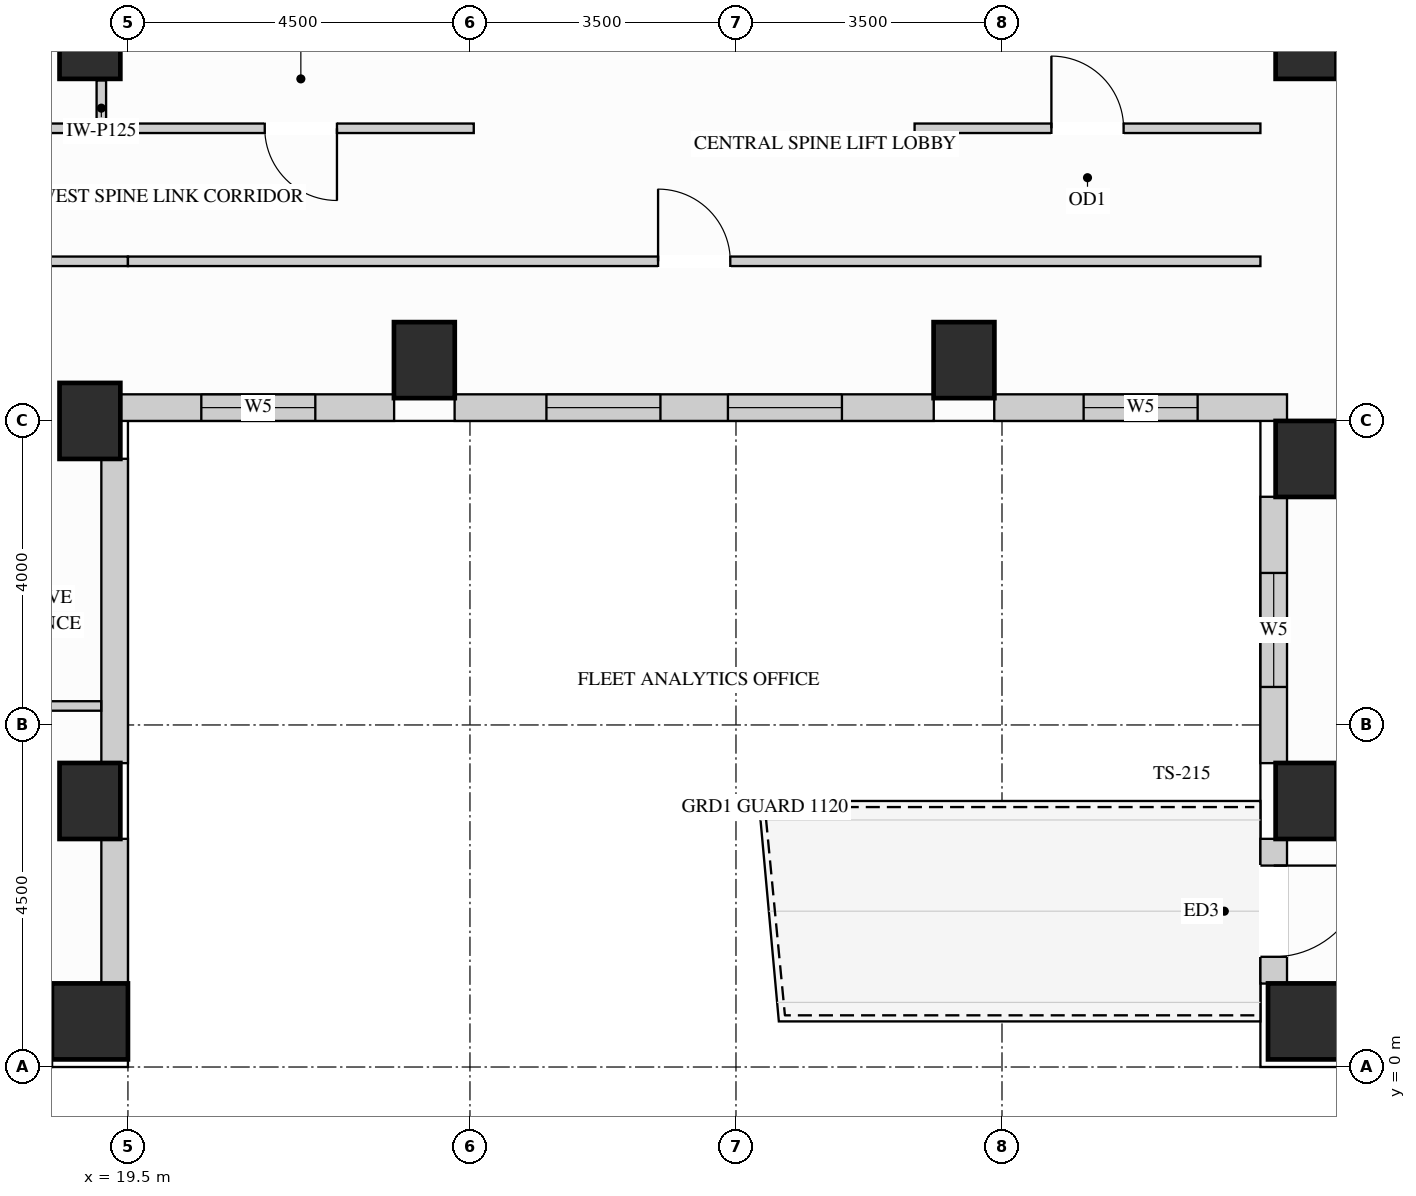
"""IFC4 building model, lengths in metres.
Left out: names, types, materials, properties, quantities, classifications, styles, units other than length and angle.
Written with IfcOpenShell. Run it as: python <this file> out.ifc"""

import sys

from ifc_helpers import new_model, si_unit, direction, frame, frame_2d, origin, origin_2d, place, context, subcontext, project, spatial, rectangle, extrude, source, transform, mapped, element, fill, save


model = new_model("IFC4")
c1 = context("Model", 3, precision=1e-05, world=origin(), true_north=direction((0.0, 1.0)))
c2 = subcontext(c1, "Body", "Model", "MODEL_VIEW")
j1 = project(units=[si_unit("LENGTHUNIT", "METRE"), si_unit("PLANEANGLEUNIT", "RADIAN")], contexts=[c1])
p1 = place(None, origin())
s1 = spatial("IfcSite", under=j1, at=p1, CompositionType="ELEMENT")
p2 = place(p1, origin())
s2 = spatial("IfcBuilding", under=s1, at=p2, CompositionType="ELEMENT")
p3 = place(p2, frame((0.0, 0.0, 164.7)))
s3 = spatial("IfcBuildingStorey", under=s2, at=p3, CompositionType="ELEMENT", Elevation=164.7)
m1 = source(origin(), c2, "Body", "SweptSolid", [
    extrude(rectangle(XDim=0.8, YDim=1.0, at=origin_2d()), origin(), (0.0, 0.0, 1.0), 3.4),
])
for number, where, z_axis, x_axis in (
    (1, (19.0, 13.5, 0.0), (0.0, 0.0, 1.0), (1.0, 0.0, 0.0)),
    (2, (19.0, 3.5, 0.0), (0.0, 0.0, 1.0), (1.0, 0.0, 0.0)),
    (3, (19.0, 8.5, 0.0), (0.0, 0.0, 1.0), (1.0, 0.0, 0.0)),
    (4, (35.0, 13.5, 0.0), (0.0, 0.0, 1.0), (1.0, 0.0, 0.0)),
    (5, (35.0, 3.5, 0.0), (0.0, 0.0, 1.0), (1.0, 0.0, 0.0)),
    (6, (35.0, 8.0, 0.0), (0.0, 0.0, 1.0), (1.0, 0.0, 0.0)),
    (7, (23.4, 9.3, 0.0), (0.0, 0.0, 1.0), (1.0, 0.0, 0.0)),
    (8, (30.5, 9.3, 0.0), (0.0, 0.0, 1.0), (1.0, 0.0, 0.0)),
):
    element("IfcColumn", number, at=place(p3, frame(where, z_axis=z_axis, x_axis=x_axis)), inside=s3, PredefinedType="COLUMN", context=c2, shape_type="MappedRepresentation", body=[
        mapped(m1, transform((0.0, 0.0, 0.0), x_axis=(1.0, 0.0, 0.0), y_axis=(0.0, 1.0, 0.0), z_axis=(0.0, 0.0, 1.0))),
    ])
m2 = source(origin(), c2, "Body", "SweptSolid", [
    extrude(rectangle(XDim=1.0, YDim=1.0, at=origin_2d()), origin(), (0.0, 0.0, 1.0), 3.4),
])
for number, where, z_axis, x_axis in (
    (9, (19.0, 0.6, 0.0), (0.0, 0.0, 1.0), (1.0, 0.0, 0.0)),
    (10, (35.0, 0.6, 0.0), (0.0, 0.0, 1.0), (1.0, 0.0, 0.0)),
):
    element("IfcColumn", number, at=place(p3, frame(where, z_axis=z_axis, x_axis=x_axis)), inside=s3, PredefinedType="COLUMN", context=c2, shape_type="MappedRepresentation", body=[
        mapped(m2, transform((0.0, 0.0, 0.0), x_axis=(1.0, 0.0, 0.0), y_axis=(0.0, 1.0, 0.0), z_axis=(0.0, 0.0, 1.0))),
    ])
p4 = place(p3, frame((14.998, 0.175, 0.0), z_axis=(0.0, 0.0, 1.0), x_axis=(1.0, 0.0, 0.0)))
e11 = element("IfcWall", 11, at=p4, inside=s3, PredefinedType="SOLIDWALL", context=c2, shape_type="SweptSolid", body=[
    extrude(rectangle(XDim=3.504, YDim=0.35, at=frame_2d((1.752, 0.0))), origin(), (0.0, 0.0, 1.0), 2.612),
])
p5 = place(p4, frame((0.552, 0.0, 0.78)))
e12 = element("IfcOpeningElement", 12, at=p5, cuts=e11, PredefinedType="OPENING", context=c2, shape_type="SweptSolid", body=[
    extrude(rectangle(XDim=2.4, YDim=1.652, at=frame_2d((1.2, 0.826))), frame((0.0, 0.185, 0.0), z_axis=(0.0, -1.0, 0.0), x_axis=(1.0, 0.0, 0.0)), (0.0, 0.0, 1.0), 0.37),
])
m3 = source(origin(), c2, "Body", "SweptSolid", [
    extrude(rectangle(XDim=1.904, YDim=0.35, at=frame_2d((0.952, 0.0))), origin(), (0.0, 0.0, 1.0), 2.612),
])
p6 = place(p3, frame((19.325, 1.098, 0.0), z_axis=(0.0, 0.0, 1.0), x_axis=(0.0, 1.0, 0.0)))
e13 = element("IfcWall", 13, at=p6, inside=s3, PredefinedType="SOLIDWALL", context=c2, shape_type="MappedRepresentation", body=[
    mapped(m3, transform((0.0, 0.0, 0.0), x_axis=(1.0, 0.0, 0.0), y_axis=(0.0, 1.0, 0.0), z_axis=(0.0, 0.0, 1.0))),
])
m4 = source(origin(), c2, "Body", "SweptSolid", [
    extrude(rectangle(XDim=4.004, YDim=0.35, at=frame_2d((2.002, 0.0))), origin(), (0.0, 0.0, 1.0), 2.612),
])
p7 = place(p3, frame((19.325, 3.998, 0.0), z_axis=(0.0, 0.0, 1.0), x_axis=(0.0, 1.0, 0.0)))
e14 = element("IfcWall", 14, at=p7, inside=s3, PredefinedType="SOLIDWALL", context=c2, shape_type="MappedRepresentation", body=[
    mapped(m4, transform((0.0, 0.0, 0.0), x_axis=(1.0, 0.0, 0.0), y_axis=(0.0, 1.0, 0.0), z_axis=(0.0, 0.0, 1.0))),
])
p8 = place(p3, frame((19.398, 8.675, 0.0), z_axis=(0.0, 0.0, 1.0), x_axis=(1.0, 0.0, 0.0)))
e15 = element("IfcWall", 15, at=p8, inside=s3, PredefinedType="SOLIDWALL", context=c2, shape_type="SweptSolid", body=[
    extrude(rectangle(XDim=3.604, YDim=0.35, at=frame_2d((1.802, 0.0))), origin(), (0.0, 0.0, 1.0), 3.385),
])
p9 = place(p8, frame((1.067, 0.0, 0.78)))
e16 = element("IfcOpeningElement", 16, at=p9, cuts=e15, PredefinedType="OPENING", context=c2, shape_type="SweptSolid", body=[
    extrude(rectangle(XDim=1.5, YDim=2.0, at=frame_2d((0.75, 1.0))), frame((0.0, 0.185, 0.0), z_axis=(0.0, -1.0, 0.0), x_axis=(1.0, 0.0, 0.0)), (0.0, 0.0, 1.0), 0.37),
])
p10 = place(p3, frame((23.798, 8.675, 0.0), z_axis=(0.0, 0.0, 1.0), x_axis=(1.0, 0.0, 0.0)))
e17 = element("IfcWall", 17, at=p10, inside=s3, PredefinedType="SOLIDWALL", context=c2, shape_type="SweptSolid", body=[
    extrude(rectangle(XDim=6.304, YDim=0.35, at=frame_2d((3.152, 0.0))), origin(), (0.0, 0.0, 1.0), 3.385),
])
p11 = place(p10, frame((1.208, 0.0, 0.78)))
e18 = element("IfcOpeningElement", 18, at=p11, cuts=e17, PredefinedType="OPENING", context=c2, shape_type="SweptSolid", body=[
    extrude(rectangle(XDim=1.5, YDim=2.0, at=frame_2d((0.75, 1.0))), frame((0.0, 0.185, 0.0), z_axis=(0.0, -1.0, 0.0), x_axis=(1.0, 0.0, 0.0)), (0.0, 0.0, 1.0), 0.37),
])
p12 = place(p10, frame((3.596, 0.0, 0.78)))
e19 = element("IfcOpeningElement", 19, at=p12, cuts=e17, PredefinedType="OPENING", context=c2, shape_type="SweptSolid", body=[
    extrude(rectangle(XDim=1.5, YDim=2.0, at=frame_2d((0.75, 1.0))), frame((0.0, 0.185, 0.0), z_axis=(0.0, -1.0, 0.0), x_axis=(1.0, 0.0, 0.0)), (0.0, 0.0, 1.0), 0.37),
])
p13 = place(p3, frame((30.898, 8.675, 0.0), z_axis=(0.0, 0.0, 1.0), x_axis=(1.0, 0.0, 0.0)))
e20 = element("IfcWall", 20, at=p13, inside=s3, PredefinedType="SOLIDWALL", context=c2, shape_type="SweptSolid", body=[
    extrude(rectangle(XDim=3.852, YDim=0.35, at=frame_2d((1.926, 0.0))), origin(), (0.0, 0.0, 1.0), 3.385),
])
p14 = place(p13, frame((1.176, 0.0, 0.78)))
e21 = element("IfcOpeningElement", 21, at=p14, cuts=e20, PredefinedType="OPENING", context=c2, shape_type="SweptSolid", body=[
    extrude(rectangle(XDim=1.5, YDim=2.0, at=frame_2d((0.75, 1.0))), frame((0.0, 0.185, 0.0), z_axis=(0.0, -1.0, 0.0), x_axis=(1.0, 0.0, 0.0)), (0.0, 0.0, 1.0), 0.37),
])
p15 = place(p3, frame((34.575, 7.502, 0.0), z_axis=(0.0, 0.0, 1.0), x_axis=(0.0, -1.0, 0.0)))
e22 = element("IfcWall", 22, at=p15, inside=s3, PredefinedType="SOLIDWALL", context=c2, shape_type="SweptSolid", body=[
    extrude(rectangle(XDim=3.504, YDim=0.35, at=frame_2d((1.752, 0.0))), origin(), (0.0, 0.0, 1.0), 2.612),
])
p16 = place(p15, frame((1.002, 0.0, 0.78)))
e23 = element("IfcOpeningElement", 23, at=p16, cuts=e22, PredefinedType="OPENING", context=c2, shape_type="SweptSolid", body=[
    extrude(rectangle(XDim=1.5, YDim=1.652, at=frame_2d((0.75, 0.826))), frame((0.0, 0.185, 0.0), z_axis=(0.0, -1.0, 0.0), x_axis=(1.0, 0.0, 0.0)), (0.0, 0.0, 1.0), 0.37),
])
p17 = place(p3, frame((34.575, 3.002, 0.0), z_axis=(0.0, 0.0, 1.0), x_axis=(0.0, -1.0, 0.0)))
e24 = element("IfcWall", 24, at=p17, inside=s3, PredefinedType="SOLIDWALL", context=c2, shape_type="SweptSolid", body=[
    extrude(rectangle(XDim=1.904, YDim=0.35, at=frame_2d((0.952, 0.0))), origin(), (0.0, 0.0, 1.0), 2.612),
])
p18 = place(p17, frame((0.352, 0.0, 0.0)))
e25 = element("IfcOpeningElement", 25, at=p18, cuts=e24, PredefinedType="OPENING", context=c2, shape_type="SweptSolid", body=[
    extrude(rectangle(XDim=1.2, YDim=2.15, at=frame_2d((0.6, 1.075))), frame((0.0, 0.185, 0.0), z_axis=(0.0, -1.0, 0.0), x_axis=(1.0, 0.0, 0.0)), (0.0, 0.0, 1.0), 0.37),
])
m5 = source(origin(), c2, "Body", "SweptSolid", [
    extrude(rectangle(XDim=0.63, YDim=0.125, at=frame_2d((0.315, 0.0))), origin(), (0.0, 0.0, 1.0), 2.773),
])
p19 = place(p3, frame((19.15, 12.35, 0.0), z_axis=(0.0, 0.0, 1.0), x_axis=(0.0, 1.0, 0.0)))
e26 = element("IfcWall", 26, at=p19, inside=s3, PredefinedType="PARTITIONING", context=c2, shape_type="MappedRepresentation", body=[
    mapped(m5, transform((0.0, 0.0, 0.0), x_axis=(1.0, 0.0, 0.0), y_axis=(0.0, 1.0, 0.0), z_axis=(0.0, 0.0, 1.0))),
])
p20 = place(p3, frame((29.85, 12.35, 0.0), z_axis=(0.0, 0.0, 1.0), x_axis=(1.0, 0.0, 0.0)))
e27 = element("IfcWall", 27, at=p20, inside=s3, PredefinedType="PARTITIONING", context=c2, shape_type="SweptSolid", body=[
    extrude(rectangle(XDim=4.55, YDim=0.125, at=frame_2d((2.275, 0.0))), origin(), (0.0, 0.0, 1.0), 3.385),
])
p21 = place(p20, frame((1.8, 0.0, 0.0)))
e28 = element("IfcOpeningElement", 28, at=p21, cuts=e27, PredefinedType="OPENING", context=c2, shape_type="SweptSolid", body=[
    extrude(rectangle(XDim=0.95, YDim=2.15, at=frame_2d((0.475, 1.075))), frame((0.0, 0.073, 0.0), z_axis=(0.0, -1.0, 0.0), x_axis=(1.0, 0.0, 0.0)), (0.0, 0.0, 1.0), 0.145),
])
m6 = source(origin(), c2, "Body", "SweptSolid", [
    extrude(rectangle(XDim=2.45, YDim=0.125, at=frame_2d((1.225, 0.0))), origin(), (0.0, 0.0, 1.0), 3.385),
])
p22 = place(p3, frame((17.05, 12.35, 0.0), z_axis=(0.0, 0.0, 1.0), x_axis=(1.0, 0.0, 0.0)))
e29 = element("IfcWall", 29, at=p22, inside=s3, PredefinedType="PARTITIONING", context=c2, shape_type="MappedRepresentation", body=[
    mapped(m6, transform((0.0, 0.0, 0.0), x_axis=(1.0, 0.0, 0.0), y_axis=(0.0, 1.0, 0.0), z_axis=(0.0, 0.0, 1.0))),
])
p23 = place(p3, frame((19.5, 12.35, 0.0), z_axis=(0.0, 0.0, 1.0), x_axis=(1.0, 0.0, 0.0)))
e30 = element("IfcWall", 30, at=p23, inside=s3, PredefinedType="PARTITIONING", context=c2, shape_type="SweptSolid", body=[
    extrude(rectangle(XDim=4.55, YDim=0.125, at=frame_2d((2.275, 0.0))), origin(), (0.0, 0.0, 1.0), 3.385),
])
p24 = place(p23, frame((1.8, 0.0, 0.0)))
e31 = element("IfcOpeningElement", 31, at=p24, cuts=e30, PredefinedType="OPENING", context=c2, shape_type="SweptSolid", body=[
    extrude(rectangle(XDim=0.95, YDim=2.15, at=frame_2d((0.475, 1.075))), frame((0.0, 0.073, 0.0), z_axis=(0.0, -1.0, 0.0), x_axis=(1.0, 0.0, 0.0)), (0.0, 0.0, 1.0), 0.145),
])
p25 = place(p3, frame((17.05, 10.6, 0.0), z_axis=(0.0, 0.0, 1.0), x_axis=(1.0, 0.0, 0.0)))
e32 = element("IfcWall", 32, at=p25, inside=s3, PredefinedType="PARTITIONING", context=c2, shape_type="MappedRepresentation", body=[
    mapped(m6, transform((0.0, 0.0, 0.0), x_axis=(1.0, 0.0, 0.0), y_axis=(0.0, 1.0, 0.0), z_axis=(0.0, 0.0, 1.0))),
])
p26 = place(p3, frame((19.5, 10.6, 0.0), z_axis=(0.0, 0.0, 1.0), x_axis=(1.0, 0.0, 0.0)))
e33 = element("IfcWall", 33, at=p26, inside=s3, PredefinedType="PARTITIONING", context=c2, shape_type="SweptSolid", body=[
    extrude(rectangle(XDim=14.9, YDim=0.125, at=frame_2d((7.45, 0.0))), origin(), (0.0, 0.0, 1.0), 3.385),
])
p27 = place(p26, frame((6.975, 0.0, 0.0)))
e34 = element("IfcOpeningElement", 34, at=p27, cuts=e33, PredefinedType="OPENING", context=c2, shape_type="SweptSolid", body=[
    extrude(rectangle(XDim=0.95, YDim=2.15, at=frame_2d((0.475, 1.075))), frame((0.0, 0.073, 0.0), z_axis=(0.0, -1.0, 0.0), x_axis=(1.0, 0.0, 0.0)), (0.0, 0.0, 1.0), 0.145),
])
m7 = source(origin(), c2, "Body", "SweptSolid", [
    extrude(rectangle(XDim=2.098, YDim=0.125, at=frame_2d((1.049, 0.0))), origin(), (0.0, 0.0, 1.0), 2.848),
])
p28 = place(p3, frame((17.05, 4.75, 0.0), z_axis=(0.0, 0.0, 1.0), x_axis=(1.0, 0.0, 0.0)))
e35 = element("IfcWall", 35, at=p28, inside=s3, PredefinedType="PARTITIONING", context=c2, shape_type="MappedRepresentation", body=[
    mapped(m7, transform((0.0, 0.0, 0.0), x_axis=(1.0, 0.0, 0.0), y_axis=(0.0, 1.0, 0.0), z_axis=(0.0, 0.0, 1.0))),
])
m8 = source(origin(), c2, "Body", "SweptSolid", [
    extrude(rectangle(XDim=1.2, YDim=2.15, at=frame_2d((0.6, 1.075))), frame((0.0, 0.025, 0.0), z_axis=(0.0, -1.0, 0.0), x_axis=(1.0, 0.0, 0.0)), (0.0, 0.0, 1.0), 0.05),
])
p29 = place(p18, frame((1.2, 0.0, 0.0), z_axis=(0.0, 0.0, 1.0), x_axis=(-1.0, 0.0, 0.0)))
e36 = element("IfcDoor", 36, at=p29, inside=s3, OperationType="SINGLE_SWING_LEFT", PredefinedType="DOOR", context=c2, shape_type="MappedRepresentation", body=[
    mapped(m8, transform((0.0, 0.0, 0.0), x_axis=(1.0, 0.0, 0.0), y_axis=(0.0, 1.0, 0.0), z_axis=(0.0, 0.0, 1.0))),
])
fill(e25, e36)
m9 = source(origin(), c2, "Body", "SweptSolid", [
    extrude(rectangle(XDim=0.95, YDim=2.15, at=frame_2d((0.475, 1.075))), frame((0.0, 0.025, 0.0), z_axis=(0.0, -1.0, 0.0), x_axis=(1.0, 0.0, 0.0)), (0.0, 0.0, 1.0), 0.05),
])
p30 = place(p24, origin())
e37 = element("IfcDoor", 37, at=p30, inside=s3, OperationType="SINGLE_SWING_RIGHT", PredefinedType="DOOR", context=c2, shape_type="MappedRepresentation", body=[
    mapped(m9, transform((0.0, 0.0, 0.0), x_axis=(1.0, 0.0, 0.0), y_axis=(0.0, 1.0, 0.0), z_axis=(0.0, 0.0, 1.0))),
])
fill(e31, e37)
p31 = place(p21, origin())
e38 = element("IfcDoor", 38, at=p31, inside=s3, OperationType="SINGLE_SWING_LEFT", PredefinedType="DOOR", context=c2, shape_type="MappedRepresentation", body=[
    mapped(m9, transform((0.0, 0.0, 0.0), x_axis=(1.0, 0.0, 0.0), y_axis=(0.0, 1.0, 0.0), z_axis=(0.0, 0.0, 1.0))),
])
fill(e28, e38)
p32 = place(p27, origin())
e39 = element("IfcDoor", 39, at=p32, inside=s3, OperationType="SINGLE_SWING_LEFT", PredefinedType="DOOR", context=c2, shape_type="MappedRepresentation", body=[
    mapped(m9, transform((0.0, 0.0, 0.0), x_axis=(1.0, 0.0, 0.0), y_axis=(0.0, 1.0, 0.0), z_axis=(0.0, 0.0, 1.0))),
])
fill(e34, e39)
m10 = source(origin(), c2, "Body", "SweptSolid", [
    extrude(rectangle(XDim=1.5, YDim=2.0, at=frame_2d((0.75, 1.0))), frame((0.0, 0.03, 0.0), z_axis=(0.0, -1.0, 0.0), x_axis=(1.0, 0.0, 0.0)), (0.0, 0.0, 1.0), 0.06),
])
p33 = place(p9, origin())
e40 = element("IfcWindow", 40, at=p33, inside=s3, PartitioningType="SINGLE_PANEL", PredefinedType="WINDOW", context=c2, shape_type="MappedRepresentation", body=[
    mapped(m10, transform((0.0, 0.0, 0.0), x_axis=(1.0, 0.0, 0.0), y_axis=(0.0, 1.0, 0.0), z_axis=(0.0, 0.0, 1.0))),
])
fill(e16, e40)
p34 = place(p11, origin())
e41 = element("IfcWindow", 41, at=p34, inside=s3, PartitioningType="SINGLE_PANEL", PredefinedType="WINDOW", context=c2, shape_type="MappedRepresentation", body=[
    mapped(m10, transform((0.0, 0.0, 0.0), x_axis=(1.0, 0.0, 0.0), y_axis=(0.0, 1.0, 0.0), z_axis=(0.0, 0.0, 1.0))),
])
fill(e18, e41)
p35 = place(p12, origin())
e42 = element("IfcWindow", 42, at=p35, inside=s3, PartitioningType="SINGLE_PANEL", PredefinedType="WINDOW", context=c2, shape_type="MappedRepresentation", body=[
    mapped(m10, transform((0.0, 0.0, 0.0), x_axis=(1.0, 0.0, 0.0), y_axis=(0.0, 1.0, 0.0), z_axis=(0.0, 0.0, 1.0))),
])
fill(e19, e42)
p36 = place(p14, origin())
e43 = element("IfcWindow", 43, at=p36, inside=s3, PartitioningType="SINGLE_PANEL", PredefinedType="WINDOW", context=c2, shape_type="MappedRepresentation", body=[
    mapped(m10, transform((0.0, 0.0, 0.0), x_axis=(1.0, 0.0, 0.0), y_axis=(0.0, 1.0, 0.0), z_axis=(0.0, 0.0, 1.0))),
])
fill(e21, e43)
m11 = source(origin(), c2, "Body", "SweptSolid", [
    extrude(rectangle(XDim=1.5, YDim=1.652, at=frame_2d((0.75, 0.826))), frame((0.0, 0.03, 0.0), z_axis=(0.0, -1.0, 0.0), x_axis=(1.0, 0.0, 0.0)), (0.0, 0.0, 1.0), 0.06),
])
p37 = place(p16, origin())
e44 = element("IfcWindow", 44, at=p37, inside=s3, PartitioningType="SINGLE_PANEL", PredefinedType="WINDOW", context=c2, shape_type="MappedRepresentation", body=[
    mapped(m11, transform((0.0, 0.0, 0.0), x_axis=(1.0, 0.0, 0.0), y_axis=(0.0, 1.0, 0.0), z_axis=(0.0, 0.0, 1.0))),
])
fill(e23, e44)
save(model, sys.argv[1])
